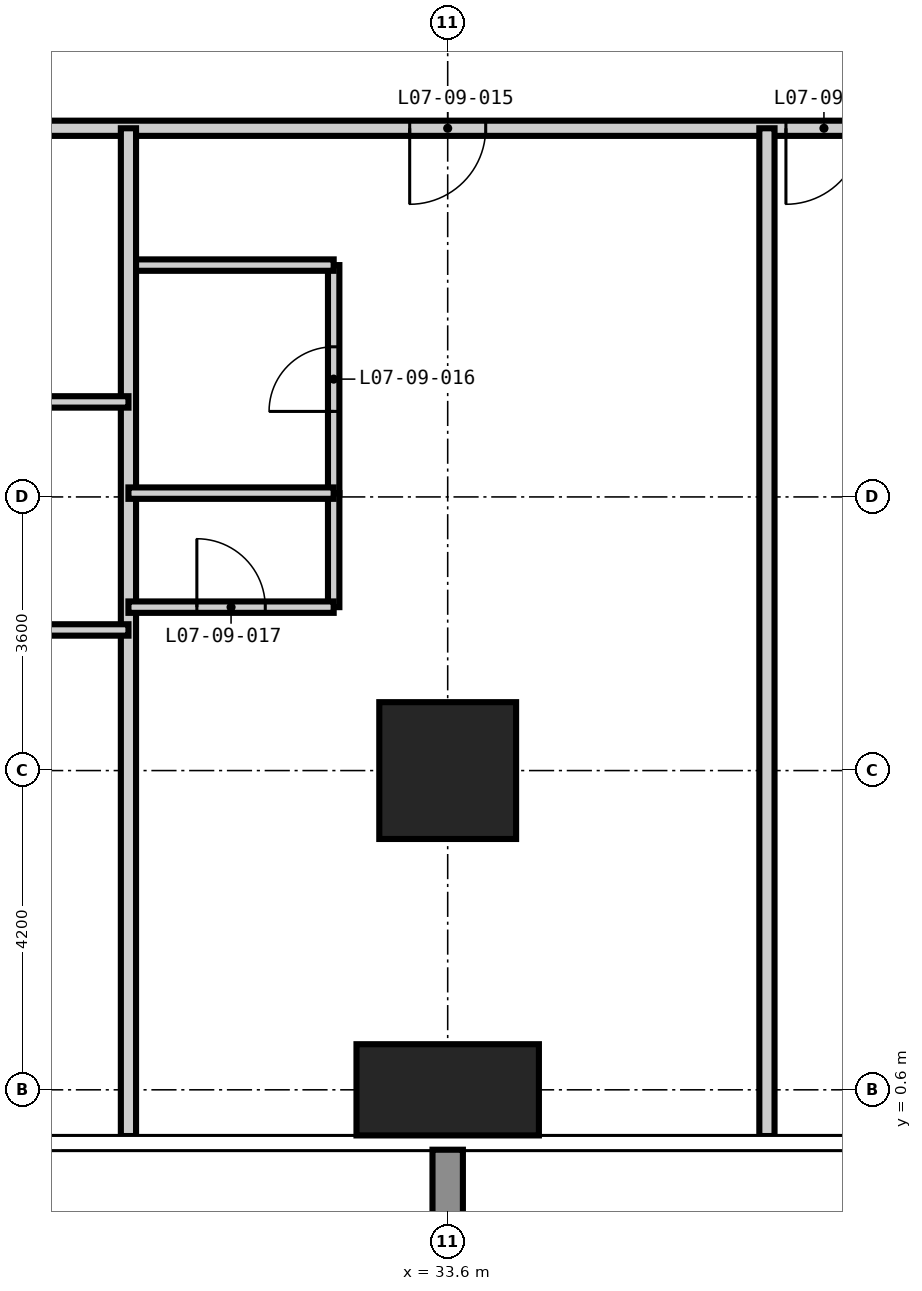
"""IFC4 building model, lengths in metres.
Left out: names, types, materials, properties, quantities, classifications, styles, units other than length and angle.
Written with IfcOpenShell. Run it as: python <this file> out.ifc"""

import sys

from ifc_helpers import new_model, si_unit, direction, frame, frame_2d, origin, origin_2d, place, context, subcontext, project, spatial, rectangle, extrude, element, fill, save


model = new_model("IFC4")
c1 = context("Model", 3, precision=1e-05, world=origin(), true_north=direction((0.0, 1.0)))
c2 = subcontext(c1, "Body", "Model", "MODEL_VIEW")
j1 = project(units=[si_unit("LENGTHUNIT", "METRE"), si_unit("PLANEANGLEUNIT", "RADIAN")], contexts=[c1])
p1 = place(None, origin())
s1 = spatial("IfcSite", under=j1, at=p1, CompositionType="ELEMENT")
p2 = place(p1, origin())
s2 = spatial("IfcBuilding", under=s1, at=p2, CompositionType="ELEMENT")
p3 = place(p2, frame((0.0, 0.0, 34.2)))
s3 = spatial("IfcBuildingStorey", under=s2, at=p3, CompositionType="ELEMENT", Elevation=34.2)
p4 = place(p3, frame((33.6, 0.6, -0.35), z_axis=(0.0, 0.0, 1.0), x_axis=(1.0, 0.0, 0.0)))
e1 = element("IfcColumn", 1, at=p4, inside=s3, PredefinedType="COLUMN", context=c2, shape_type="SweptSolid", body=[
    extrude(rectangle(XDim=2.4, YDim=1.2, at=origin_2d()), origin(), (0.0, 0.0, 1.0), 3.6),
])
p5 = place(p3, frame((33.6, 4.8, -0.35), z_axis=(0.0, 0.0, 1.0), x_axis=(1.0, 0.0, 0.0)))
e2 = element("IfcColumn", 2, at=p5, inside=s3, PredefinedType="COLUMN", context=c2, shape_type="SweptSolid", body=[
    extrude(rectangle(XDim=1.8, YDim=1.8, at=origin_2d()), origin(), (0.0, 0.0, 1.0), 3.6),
])
p6 = place(p3, frame((32.1, 8.45, 0.0), z_axis=(0.0, 0.0, 1.0), x_axis=(0.0, 1.0, 0.0)))
e3 = element("IfcWall", 3, at=p6, inside=s3, PredefinedType="PARTITIONING", context=c2, shape_type="SweptSolid", body=[
    extrude(rectangle(XDim=3.0, YDim=0.15, at=frame_2d((1.5, 0.0))), origin(), (0.0, 0.0, 1.0), 3.25),
])
p7 = place(p6, frame((1.075, 0.0, 0.0)))
e4 = element("IfcOpeningElement", 4, at=p7, cuts=e3, PredefinedType="OPENING", context=c2, shape_type="SweptSolid", body=[
    extrude(rectangle(XDim=0.85, YDim=2.1, at=frame_2d((0.425, 1.05))), frame((0.0, 0.085, 0.0), z_axis=(0.0, -1.0, 0.0), x_axis=(1.0, 0.0, 0.0)), (0.0, 0.0, 1.0), 0.17),
])
p8 = place(p3, frame((29.4, 11.45, 0.0), z_axis=(0.0, 0.0, 1.0), x_axis=(1.0, 0.0, 0.0)))
e5 = element("IfcWall", 5, at=p8, inside=s3, PredefinedType="PARTITIONING", context=c2, shape_type="SweptSolid", body=[
    extrude(rectangle(XDim=2.7, YDim=0.15, at=frame_2d((1.35, 0.0))), origin(), (0.0, 0.0, 1.0), 3.25),
])
p9 = place(p3, frame((45.85, 13.25, 0.0), z_axis=(0.0, 0.0, 1.0), x_axis=(-1.0, 0.0, 0.0)))
e6 = element("IfcWall", 6, at=p9, inside=s3, PredefinedType="PARTITIONING", context=c2, shape_type="SweptSolid", body=[
    extrude(rectangle(XDim=32.6, YDim=0.2, at=frame_2d((16.3, 0.0))), origin(), (0.0, 0.0, 1.0), 3.25),
])
p10 = place(p9, frame((25.1, 0.0, 0.0)))
e7 = element("IfcOpeningElement", 7, at=p10, cuts=e6, PredefinedType="OPENING", context=c2, shape_type="SweptSolid", body=[
    extrude(rectangle(XDim=1.0, YDim=2.2, at=frame_2d((0.5, 1.1))), frame((0.0, 0.11, 0.0), z_axis=(0.0, -1.0, 0.0), x_axis=(1.0, 0.0, 0.0)), (0.0, 0.0, 1.0), 0.22),
])
p11 = place(p9, frame((21.65, 0.0, 0.0)))
e8 = element("IfcOpeningElement", 8, at=p11, cuts=e6, PredefinedType="OPENING", context=c2, shape_type="SweptSolid", body=[
    extrude(rectangle(XDim=1.0, YDim=2.2, at=frame_2d((0.5, 1.1))), frame((0.0, 0.11, 0.0), z_axis=(0.0, -1.0, 0.0), x_axis=(1.0, 0.0, 0.0)), (0.0, 0.0, 1.0), 0.22),
])
p12 = place(p9, frame((11.75, 0.0, 0.0)))
e9 = element("IfcOpeningElement", 9, at=p12, cuts=e6, PredefinedType="OPENING", context=c2, shape_type="SweptSolid", body=[
    extrude(rectangle(XDim=1.0, YDim=2.2, at=frame_2d((0.5, 1.1))), frame((0.0, 0.11, 0.0), z_axis=(0.0, -1.0, 0.0), x_axis=(1.0, 0.0, 0.0)), (0.0, 0.0, 1.0), 0.22),
])
p13 = place(p9, frame((6.8, 0.0, 0.0)))
e10 = element("IfcOpeningElement", 10, at=p13, cuts=e6, PredefinedType="OPENING", context=c2, shape_type="SweptSolid", body=[
    extrude(rectangle(XDim=1.0, YDim=2.2, at=frame_2d((0.5, 1.1))), frame((0.0, 0.11, 0.0), z_axis=(0.0, -1.0, 0.0), x_axis=(1.0, 0.0, 0.0)), (0.0, 0.0, 1.0), 0.22),
])
for number, where, z_axis, x_axis in (
    (11, (29.4, -0.008, 0.0), (0.0, 0.0, 1.0), (0.0, 1.0, 0.0)),
    (12, (37.8, -0.008, 0.0), (0.0, 0.0, 1.0), (0.0, 1.0, 0.0)),
):
    element("IfcWall", number, at=place(p3, frame(where, z_axis=z_axis, x_axis=x_axis)), inside=s3, PredefinedType="PARTITIONING", context=c2, shape_type="SweptSolid", body=[
        extrude(rectangle(XDim=13.258, YDim=0.2, at=frame_2d((6.629, 0.0))), origin(), (0.0, 0.0, 1.0), 3.25),
    ])
p14 = place(p3, frame((32.1, 6.95, 0.0), z_axis=(0.0, 0.0, 1.0), x_axis=(0.0, 1.0, 0.0)))
e13 = element("IfcWall", 13, at=p14, inside=s3, PredefinedType="PARTITIONING", context=c2, shape_type="SweptSolid", body=[
    extrude(rectangle(XDim=1.5, YDim=0.15, at=frame_2d((0.75, 0.0))), origin(), (0.0, 0.0, 1.0), 3.25),
])
p15 = place(p3, frame((26.4, 6.65, 0.0), z_axis=(0.0, 0.0, 1.0), x_axis=(1.0, 0.0, 0.0)))
e14 = element("IfcWall", 14, at=p15, inside=s3, PredefinedType="PARTITIONING", context=c2, shape_type="SweptSolid", body=[
    extrude(rectangle(XDim=3.0, YDim=0.15, at=frame_2d((1.5, 0.0))), origin(), (0.0, 0.0, 1.0), 3.25),
])
p16 = place(p3, frame((29.4, 6.95, 0.0), z_axis=(0.0, 0.0, 1.0), x_axis=(1.0, 0.0, 0.0)))
e15 = element("IfcWall", 15, at=p16, inside=s3, PredefinedType="PARTITIONING", context=c2, shape_type="SweptSolid", body=[
    extrude(rectangle(XDim=2.7, YDim=0.15, at=frame_2d((1.35, 0.0))), origin(), (0.0, 0.0, 1.0), 3.25),
])
p17 = place(p16, frame((0.9, 0.0, 0.0)))
e16 = element("IfcOpeningElement", 16, at=p17, cuts=e15, PredefinedType="OPENING", context=c2, shape_type="SweptSolid", body=[
    extrude(rectangle(XDim=0.9, YDim=2.1, at=frame_2d((0.45, 1.05))), frame((0.0, 0.085, 0.0), z_axis=(0.0, -1.0, 0.0), x_axis=(1.0, 0.0, 0.0)), (0.0, 0.0, 1.0), 0.17),
])
p18 = place(p3, frame((29.4, 8.45, 0.0), z_axis=(0.0, 0.0, 1.0), x_axis=(1.0, 0.0, 0.0)))
e17 = element("IfcWall", 17, at=p18, inside=s3, PredefinedType="PARTITIONING", context=c2, shape_type="SweptSolid", body=[
    extrude(rectangle(XDim=2.7, YDim=0.15, at=frame_2d((1.35, 0.0))), origin(), (0.0, 0.0, 1.0), 3.25),
])
p19 = place(p3, frame((26.4, 9.65, 0.0), z_axis=(0.0, 0.0, 1.0), x_axis=(1.0, 0.0, 0.0)))
e18 = element("IfcWall", 18, at=p19, inside=s3, PredefinedType="PARTITIONING", context=c2, shape_type="SweptSolid", body=[
    extrude(rectangle(XDim=3.0, YDim=0.15, at=frame_2d((1.5, 0.0))), origin(), (0.0, 0.0, 1.0), 3.25),
])
p20 = place(p12, origin())
e19 = element("IfcDoor", 19, at=p20, inside=s3, OperationType="SINGLE_SWING_RIGHT", PredefinedType="DOOR", context=c2, shape_type="SweptSolid", body=[
    extrude(rectangle(XDim=1.0, YDim=2.2, at=frame_2d((0.5, 1.1))), frame((0.0, 0.025, 0.0), z_axis=(0.0, -1.0, 0.0), x_axis=(1.0, 0.0, 0.0)), (0.0, 0.0, 1.0), 0.05),
])
fill(e9, e19)
p21 = place(p7, origin())
e20 = element("IfcDoor", 20, at=p21, inside=s3, OperationType="SINGLE_SWING_LEFT", PredefinedType="DOOR", context=c2, shape_type="SweptSolid", body=[
    extrude(rectangle(XDim=0.85, YDim=2.1, at=frame_2d((0.425, 1.05))), frame((0.0, 0.025, 0.0), z_axis=(0.0, -1.0, 0.0), x_axis=(1.0, 0.0, 0.0)), (0.0, 0.0, 1.0), 0.05),
])
fill(e4, e20)
p22 = place(p17, origin())
e21 = element("IfcDoor", 21, at=p22, inside=s3, OperationType="SINGLE_SWING_LEFT", PredefinedType="DOOR", context=c2, shape_type="SweptSolid", body=[
    extrude(rectangle(XDim=0.9, YDim=2.1, at=frame_2d((0.45, 1.05))), frame((0.0, 0.025, 0.0), z_axis=(0.0, -1.0, 0.0), x_axis=(1.0, 0.0, 0.0)), (0.0, 0.0, 1.0), 0.05),
])
fill(e16, e21)
p23 = place(p13, origin())
e22 = element("IfcDoor", 22, at=p23, inside=s3, OperationType="SINGLE_SWING_RIGHT", PredefinedType="DOOR", context=c2, shape_type="SweptSolid", body=[
    extrude(rectangle(XDim=1.0, YDim=2.2, at=frame_2d((0.5, 1.1))), frame((0.0, 0.025, 0.0), z_axis=(0.0, -1.0, 0.0), x_axis=(1.0, 0.0, 0.0)), (0.0, 0.0, 1.0), 0.05),
])
fill(e10, e22)
save(model, sys.argv[1])
